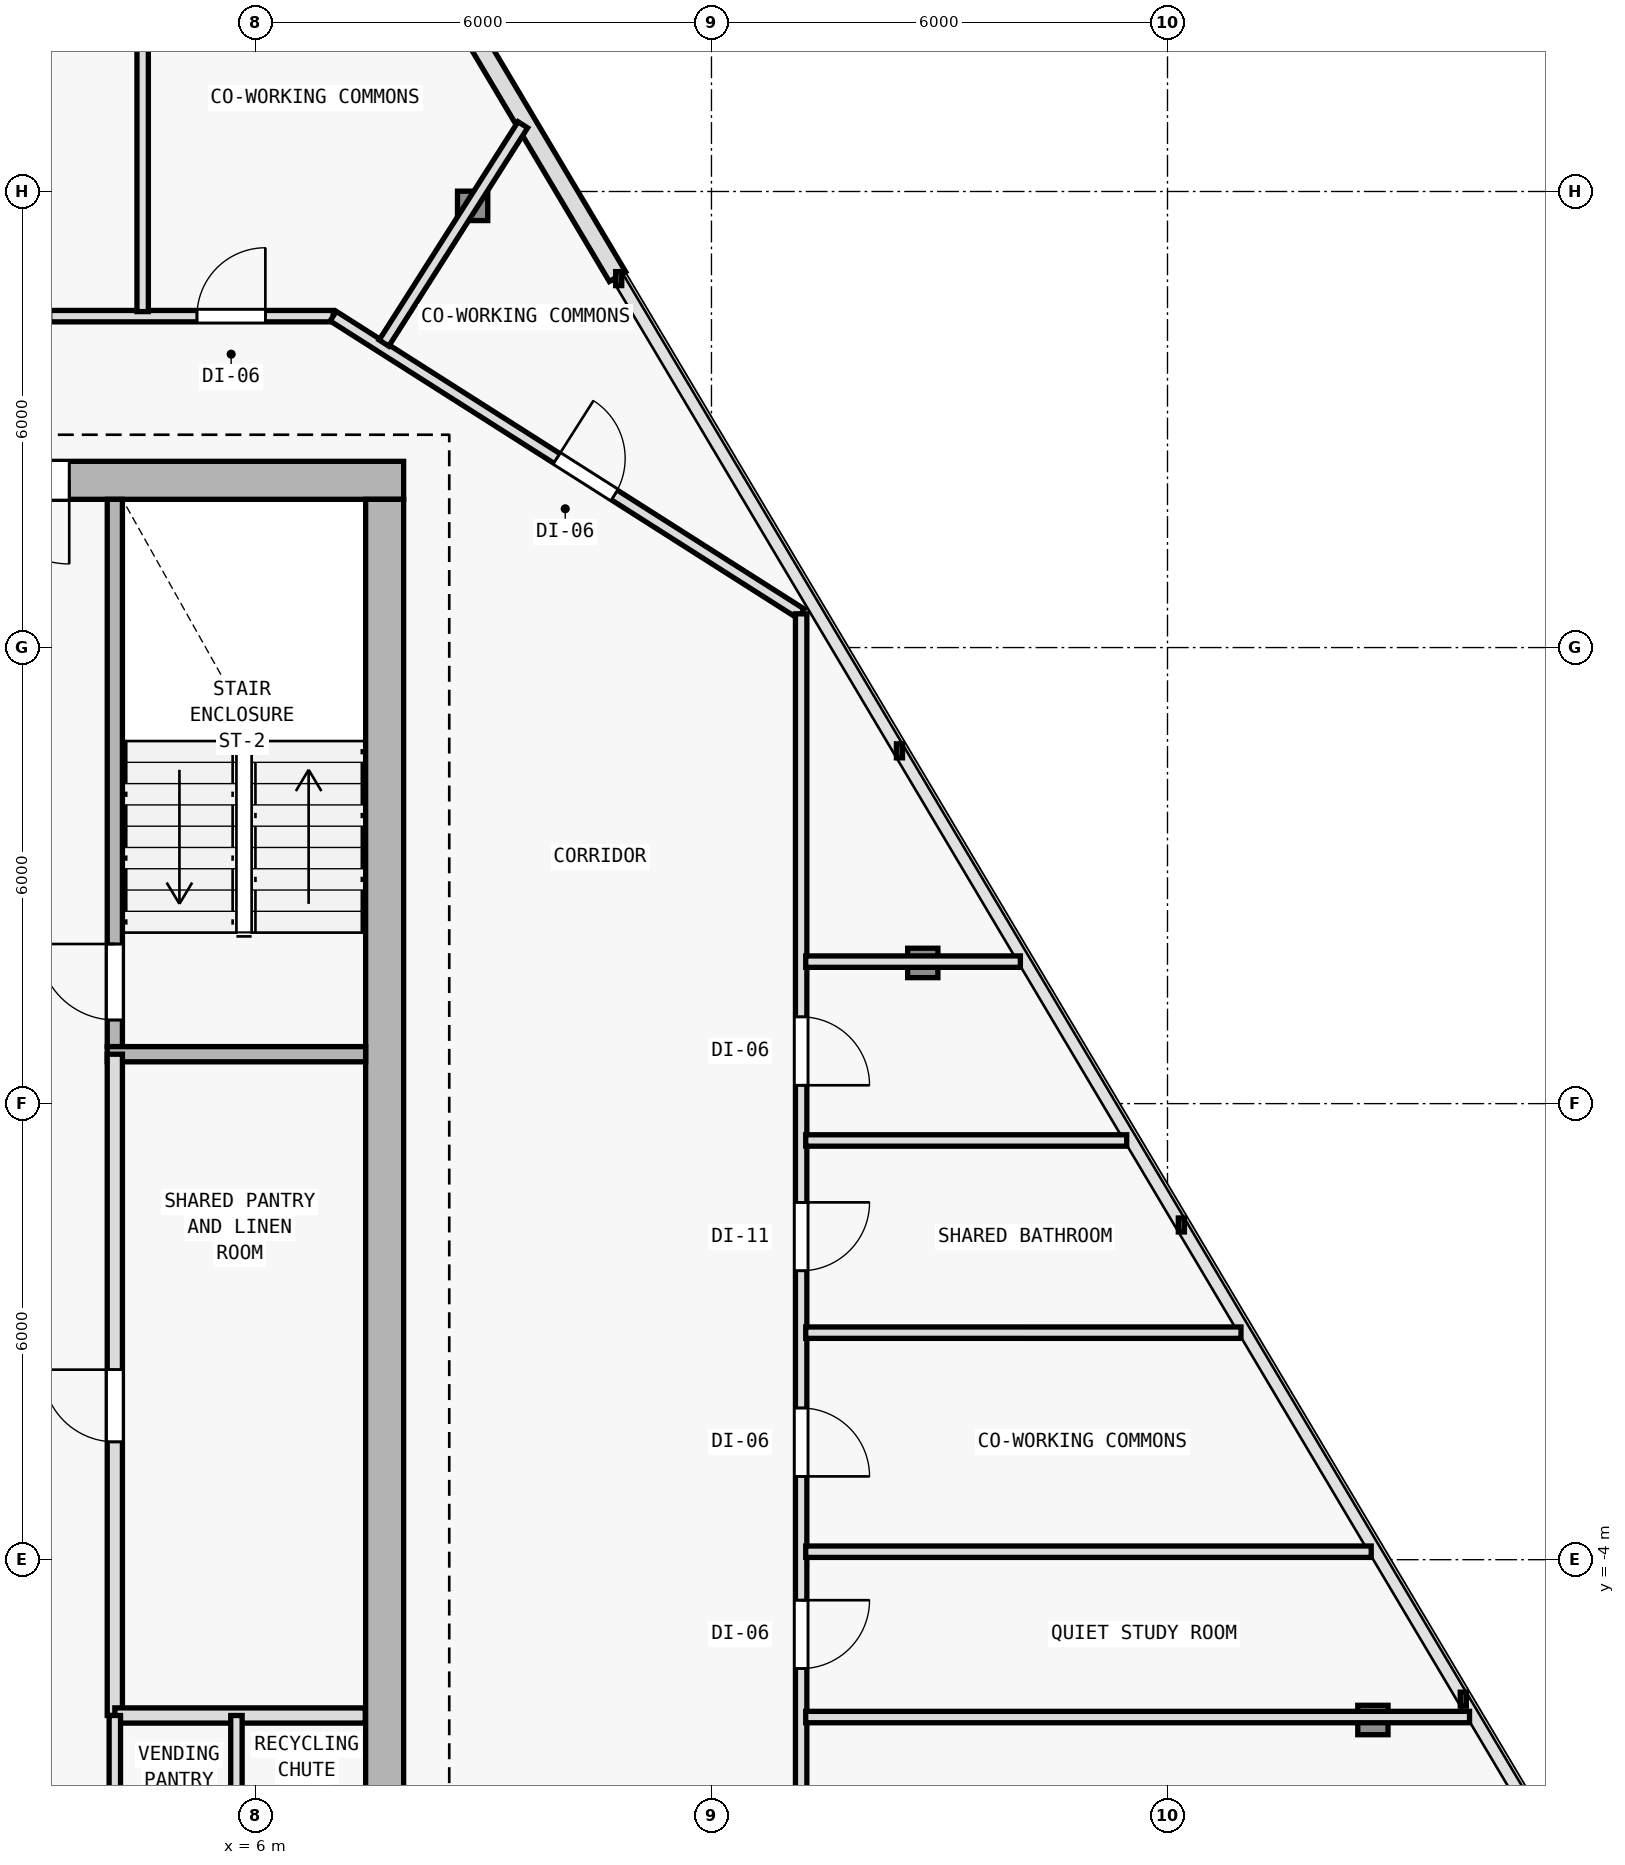
"""IFC4 building model, lengths in metres.
Left out: names, types, materials, properties, quantities, classifications, styles, units other than length and angle.
Written with IfcOpenShell. Run it as: python <this file> out.ifc"""

import sys

from ifc_helpers import new_model, si_unit, direction, frame, frame_2d, origin, origin_2d, place, context, subcontext, project, spatial, rectangle, i_section, extrude, element, fill, save


model = new_model("IFC4")
c1 = context("Model", 3, precision=1e-05, world=origin(), true_north=direction((0.0, 1.0)))
c2 = subcontext(c1, "Body", "Model", "MODEL_VIEW")
j1 = project(units=[si_unit("LENGTHUNIT", "METRE"), si_unit("PLANEANGLEUNIT", "RADIAN")], contexts=[c1])
p1 = place(None, origin())
s1 = spatial("IfcSite", under=j1, at=p1, CompositionType="ELEMENT")
p2 = place(p1, origin())
s2 = spatial("IfcBuilding", under=s1, at=p2, CompositionType="ELEMENT")
p3 = place(p2, frame((0.0, 0.0, 205.5)))
s3 = spatial("IfcBuildingStorey", under=s2, at=p3, CompositionType="ELEMENT", Elevation=205.5)
for number, where, z_axis, x_axis in (
    (1, (7.7, 10.2, 0.0), (0.0, 0.0, 1.0), (1.0, 0.0, 0.0)),
    (2, (7.7, 0.4, 0.0), (0.0, 0.0, 1.0), (1.0, 0.0, 0.0)),
):
    element("IfcColumn", number, at=place(p3, frame(where, z_axis=z_axis, x_axis=x_axis)), inside=s3, PredefinedType="COLUMN", context=c2, shape_type="SweptSolid", body=[
        extrude(i_section(OverallWidth=0.398, OverallDepth=0.387, WebThickness=0.013, FlangeThickness=0.022, FilletRadius=0.015, at=origin_2d()), origin(), (0.0, 0.0, 1.0), 3.6),
    ])
p4 = place(p3, frame((20.702, -6.109, 0.006), z_axis=(-0.026039494941, 0.021620259507, 0.999427090428), x_axis=(-0.638800249892, -0.769372628015, 0.0)))
e3 = element("IfcColumn", 3, at=p4, inside=s3, PredefinedType="COLUMN", context=c2, shape_type="SweptSolid", body=[
    extrude(i_section(OverallWidth=0.398, OverallDepth=0.387, WebThickness=0.013, FlangeThickness=0.022, FilletRadius=0.015, at=origin_2d()), origin(), (0.0, 0.0, 1.0), 3.591),
])
p5 = place(p3, frame((14.78, 3.851, 0.006), z_axis=(-0.018907326549, 0.00952167524, 0.999775900241), x_axis=(-0.449781931574, -0.893138406984, 0.0)))
e4 = element("IfcColumn", 4, at=p5, inside=s3, PredefinedType="COLUMN", context=c2, shape_type="SweptSolid", body=[
    extrude(i_section(OverallWidth=0.398, OverallDepth=0.387, WebThickness=0.013, FlangeThickness=0.022, FilletRadius=0.015, at=origin_2d()), origin(), (0.0, 0.0, 1.0), 3.59),
])
p6 = place(p3, frame((8.857, 13.811, 0.006), z_axis=(-0.011699840322, -0.002584848443, 0.999928213571), x_axis=(0.215728093413, -0.976453475447, 0.0)))
e5 = element("IfcColumn", 5, at=p6, inside=s3, PredefinedType="COLUMN", context=c2, shape_type="SweptSolid", body=[
    extrude(i_section(OverallWidth=0.398, OverallDepth=0.387, WebThickness=0.013, FlangeThickness=0.022, FilletRadius=0.015, at=origin_2d()), origin(), (0.0, 0.0, 1.0), 3.589),
])
p7 = place(p3, frame((5.551, 21.647, 0.0), z_axis=(0.0, 0.0, 1.0), x_axis=(0.511094988088, -0.859524236512, 0.0)))
e6 = element("IfcWall", 6, at=p7, inside=s3, PredefinedType="SOLIDWALL", context=c2, shape_type="SweptSolid", body=[
    extrude(rectangle(XDim=10.2, YDim=0.25, at=frame_2d((5.1, 0.0))), origin(), (0.0, 0.0, 1.0), 3.35),
])
p8 = place(p7, frame((4.65, 0.0, 0.62)))
e7 = element("IfcOpeningElement", 7, at=p8, cuts=e6, PredefinedType="OPENING", context=c2, shape_type="SweptSolid", body=[
    extrude(rectangle(XDim=0.9, YDim=1.6, at=frame_2d((0.45, 0.8))), frame((0.0, 0.135, 0.0), z_axis=(0.0, -1.0, 0.0), x_axis=(1.0, 0.0, 0.0)), (0.0, 0.0, 1.0), 0.27),
])
p9 = place(p3, frame((7.95, 10.2, 0.0), z_axis=(0.0, 0.0, 1.0), x_axis=(-1.0, 0.0, 0.0)))
e8 = element("IfcWall", 8, at=p9, inside=s3, PredefinedType="SHEAR", context=c2, shape_type="SweptSolid", body=[
    extrude(rectangle(XDim=15.9, YDim=0.5, at=frame_2d((7.95, 0.0))), origin(), (0.0, 0.0, 1.0), 3.35),
])
p10 = place(p9, frame((4.4, 0.0, 0.0)))
e9 = element("IfcOpeningElement", 9, at=p10, cuts=e8, PredefinedType="OPENING", context=c2, shape_type="SweptSolid", body=[
    extrude(rectangle(XDim=1.1, YDim=2.15, at=frame_2d((0.55, 1.075))), frame((0.0, 0.26, 0.0), z_axis=(0.0, -1.0, 0.0), x_axis=(1.0, 0.0, 0.0)), (0.0, 0.0, 1.0), 0.52),
])
p11 = place(p3, frame((7.7, 9.95, 0.0), z_axis=(0.0, 0.0, 1.0), x_axis=(0.0, -1.0, 0.0)))
e10 = element("IfcWall", 10, at=p11, inside=s3, PredefinedType="SHEAR", context=c2, shape_type="SweptSolid", body=[
    extrude(rectangle(XDim=19.1, YDim=0.5, at=frame_2d((9.55, 0.0))), origin(), (0.0, 0.0, 1.0), 3.35),
])
p12 = place(p3, frame((4.15, 2.75, 0.0), z_axis=(0.0, 0.0, 1.0), x_axis=(0.0, 1.0, 0.0)))
e11 = element("IfcWall", 11, at=p12, inside=s3, PredefinedType="SOLIDWALL", context=c2, shape_type="SweptSolid", body=[
    extrude(rectangle(XDim=7.2, YDim=0.2, at=frame_2d((3.6, 0.0))), origin(), (0.0, 0.0, 1.0), 3.35),
])
p13 = place(p12, frame((0.35, 0.0, 0.0)))
e12 = element("IfcOpeningElement", 12, at=p13, cuts=e11, PredefinedType="OPENING", context=c2, shape_type="SweptSolid", body=[
    extrude(rectangle(XDim=1.0, YDim=2.15, at=frame_2d((0.5, 1.075))), frame((0.0, 0.11, 0.0), z_axis=(0.0, -1.0, 0.0), x_axis=(1.0, 0.0, 0.0)), (0.0, 0.0, 1.0), 0.22),
])
p14 = place(p3, frame((4.05, 2.65, 0.0), z_axis=(0.0, 0.0, 1.0), x_axis=(1.0, 0.0, 0.0)))
e13 = element("IfcWall", 13, at=p14, inside=s3, PredefinedType="SOLIDWALL", context=c2, shape_type="SweptSolid", body=[
    extrude(rectangle(XDim=3.4, YDim=0.2, at=frame_2d((1.7, 0.0))), origin(), (0.0, 0.0, 1.0), 3.35),
])
p15 = place(p3, frame((4.15, -6.05, 0.0), z_axis=(0.0, 0.0, 1.0), x_axis=(0.0, 1.0, 0.0)))
e14 = element("IfcWall", 14, at=p15, inside=s3, PredefinedType="SOLIDWALL", context=c2, shape_type="SweptSolid", body=[
    extrude(rectangle(XDim=8.7, YDim=0.2, at=frame_2d((4.35, 0.0))), origin(), (0.0, 0.0, 1.0), 3.35),
])
p16 = place(p15, frame((3.6, 0.0, 0.0)))
e15 = element("IfcOpeningElement", 15, at=p16, cuts=e14, PredefinedType="OPENING", context=c2, shape_type="SweptSolid", body=[
    extrude(rectangle(XDim=0.95, YDim=2.1, at=frame_2d((0.475, 1.05))), frame((0.0, 0.11, 0.0), z_axis=(0.0, -1.0, 0.0), x_axis=(1.0, 0.0, 0.0)), (0.0, 0.0, 1.0), 0.22),
])
p17 = place(p3, frame((4.15, -6.05, 0.0), z_axis=(0.0, 0.0, 1.0), x_axis=(1.0, 0.0, 0.0)))
e16 = element("IfcWall", 16, at=p17, inside=s3, PredefinedType="SOLIDWALL", context=c2, shape_type="SweptSolid", body=[
    extrude(rectangle(XDim=3.295, YDim=0.2, at=frame_2d((1.647, 0.0))), origin(), (0.0, 0.0, 1.0), 3.35),
])
p18 = place(p3, frame((4.15, -9.145, 0.0), z_axis=(0.0, 0.0, 1.0), x_axis=(0.0, 1.0, 0.0)))
e17 = element("IfcWall", 17, at=p18, inside=s3, PredefinedType="PARTITIONING", context=c2, shape_type="SweptSolid", body=[
    extrude(rectangle(XDim=3.095, YDim=0.15, at=frame_2d((1.547, 0.0))), origin(), (0.0, 0.0, 1.0), 3.35),
])
p19 = place(p18, frame((0.845, 0.0, 0.0)))
e18 = element("IfcOpeningElement", 18, at=p19, cuts=e17, PredefinedType="OPENING", context=c2, shape_type="SweptSolid", body=[
    extrude(rectangle(XDim=0.9, YDim=2.1, at=frame_2d((0.45, 1.05))), frame((0.0, 0.085, 0.0), z_axis=(0.0, -1.0, 0.0), x_axis=(1.0, 0.0, 0.0)), (0.0, 0.0, 1.0), 0.17),
])
p20 = place(p3, frame((5.75, -9.145, 0.0), z_axis=(0.0, 0.0, 1.0), x_axis=(0.0, 1.0, 0.0)))
e19 = element("IfcWall", 19, at=p20, inside=s3, PredefinedType="PARTITIONING", context=c2, shape_type="SweptSolid", body=[
    extrude(rectangle(XDim=3.095, YDim=0.15, at=frame_2d((1.547, 0.0))), origin(), (0.0, 0.0, 1.0), 3.35),
])
p21 = place(p20, frame((0.845, 0.0, 0.0)))
e20 = element("IfcOpeningElement", 20, at=p21, cuts=e19, PredefinedType="OPENING", context=c2, shape_type="SweptSolid", body=[
    extrude(rectangle(XDim=0.9, YDim=2.1, at=frame_2d((0.45, 1.05))), frame((0.0, 0.085, 0.0), z_axis=(0.0, -1.0, 0.0), x_axis=(1.0, 0.0, 0.0)), (0.0, 0.0, 1.0), 0.17),
])
p22 = place(p3, frame((-7.041, 12.36, 0.0), z_axis=(0.0, 0.0, 1.0), x_axis=(1.0, 0.0, 0.0)))
e21 = element("IfcWall", 21, at=p22, inside=s3, PredefinedType="PARTITIONING", context=c2, shape_type="SweptSolid", body=[
    extrude(rectangle(XDim=14.064, YDim=0.15, at=frame_2d((7.032, 0.0))), origin(), (0.0, 0.0, 1.0), 2.975),
])
p23 = place(p22, frame((12.272, 0.0, 0.0)))
e22 = element("IfcOpeningElement", 22, at=p23, cuts=e21, PredefinedType="OPENING", context=c2, shape_type="SweptSolid", body=[
    extrude(rectangle(XDim=0.9, YDim=2.1, at=frame_2d((0.45, 1.05))), frame((0.0, 0.085, 0.0), z_axis=(0.0, -1.0, 0.0), x_axis=(1.0, 0.0, 0.0)), (0.0, 0.0, 1.0), 0.17),
])
p24 = place(p22, frame((9.449, 0.0, 0.0)))
e23 = element("IfcOpeningElement", 23, at=p24, cuts=e21, PredefinedType="OPENING", context=c2, shape_type="SweptSolid", body=[
    extrude(rectangle(XDim=0.9, YDim=2.1, at=frame_2d((0.45, 1.05))), frame((0.0, 0.085, 0.0), z_axis=(0.0, -1.0, 0.0), x_axis=(1.0, 0.0, 0.0)), (0.0, 0.0, 1.0), 0.17),
])
p25 = place(p22, frame((6.614, 0.0, 0.0)))
e24 = element("IfcOpeningElement", 24, at=p25, cuts=e21, PredefinedType="OPENING", context=c2, shape_type="SweptSolid", body=[
    extrude(rectangle(XDim=0.9, YDim=2.1, at=frame_2d((0.45, 1.05))), frame((0.0, 0.085, 0.0), z_axis=(0.0, -1.0, 0.0), x_axis=(1.0, 0.0, 0.0)), (0.0, 0.0, 1.0), 0.17),
])
p26 = place(p22, frame((2.786, 0.0, 0.0)))
e25 = element("IfcOpeningElement", 25, at=p26, cuts=e21, PredefinedType="OPENING", context=c2, shape_type="SweptSolid", body=[
    extrude(rectangle(XDim=0.9, YDim=2.1, at=frame_2d((0.45, 1.05))), frame((0.0, 0.085, 0.0), z_axis=(0.0, -1.0, 0.0), x_axis=(1.0, 0.0, 0.0)), (0.0, 0.0, 1.0), 0.17),
])
p27 = place(p3, frame((7.023, 12.36, 0.0), z_axis=(0.0, 0.0, 1.0), x_axis=(0.84376480085, -0.536713108511, 0.0)))
e26 = element("IfcWall", 26, at=p27, inside=s3, PredefinedType="PARTITIONING", context=c2, shape_type="SweptSolid", body=[
    extrude(rectangle(XDim=7.297, YDim=0.15, at=frame_2d((3.648, 0.0))), origin(), (0.0, 0.0, 1.0), 2.975),
])
p28 = place(p27, frame((3.486, 0.0, 0.0)))
e27 = element("IfcOpeningElement", 27, at=p28, cuts=e26, PredefinedType="OPENING", context=c2, shape_type="SweptSolid", body=[
    extrude(rectangle(XDim=0.9, YDim=2.1, at=frame_2d((0.45, 1.05))), frame((0.0, 0.085, 0.0), z_axis=(0.0, -1.0, 0.0), x_axis=(1.0, 0.0, 0.0)), (0.0, 0.0, 1.0), 0.17),
])
p29 = place(p3, frame((13.18, 8.444, 0.0), z_axis=(0.0, 0.0, 1.0), x_axis=(0.0, -1.0, 0.0)))
e28 = element("IfcWall", 28, at=p29, inside=s3, PredefinedType="PARTITIONING", context=c2, shape_type="SweptSolid", body=[
    extrude(rectangle(XDim=20.004, YDim=0.15, at=frame_2d((10.002, 0.0))), origin(), (0.0, 0.0, 1.0), 2.825),
])
p30 = place(p29, frame((12.977, 0.0, 0.0)))
e29 = element("IfcOpeningElement", 29, at=p30, cuts=e28, PredefinedType="OPENING", context=c2, shape_type="SweptSolid", body=[
    extrude(rectangle(XDim=0.9, YDim=2.1, at=frame_2d((0.45, 1.05))), frame((0.0, 0.085, 0.0), z_axis=(0.0, -1.0, 0.0), x_axis=(1.0, 0.0, 0.0)), (0.0, 0.0, 1.0), 0.17),
])
p31 = place(p29, frame((10.448, 0.0, 0.0)))
e30 = element("IfcOpeningElement", 30, at=p31, cuts=e28, PredefinedType="OPENING", context=c2, shape_type="SweptSolid", body=[
    extrude(rectangle(XDim=0.9, YDim=2.1, at=frame_2d((0.45, 1.05))), frame((0.0, 0.085, 0.0), z_axis=(0.0, -1.0, 0.0), x_axis=(1.0, 0.0, 0.0)), (0.0, 0.0, 1.0), 0.17),
])
p32 = place(p29, frame((7.743, 0.0, 0.0)))
e31 = element("IfcOpeningElement", 31, at=p32, cuts=e28, PredefinedType="OPENING", context=c2, shape_type="SweptSolid", body=[
    extrude(rectangle(XDim=0.9, YDim=2.1, at=frame_2d((0.45, 1.05))), frame((0.0, 0.085, 0.0), z_axis=(0.0, -1.0, 0.0), x_axis=(1.0, 0.0, 0.0)), (0.0, 0.0, 1.0), 0.17),
])
p33 = place(p29, frame((5.302, 0.0, 0.0)))
e32 = element("IfcOpeningElement", 32, at=p33, cuts=e28, PredefinedType="OPENING", context=c2, shape_type="SweptSolid", body=[
    extrude(rectangle(XDim=0.9, YDim=2.1, at=frame_2d((0.45, 1.05))), frame((0.0, 0.085, 0.0), z_axis=(0.0, -1.0, 0.0), x_axis=(1.0, 0.0, 0.0)), (0.0, 0.0, 1.0), 0.17),
])
p34 = place(p3, frame((13.24, -6.07, 0.0), z_axis=(0.0, 0.0, 1.0), x_axis=(1.0, 0.0, 0.0)))
e33 = element("IfcWall", 33, at=p34, inside=s3, PredefinedType="PARTITIONING", context=c2, shape_type="SweptSolid", body=[
    extrude(rectangle(XDim=8.734, YDim=0.15, at=frame_2d((4.367, 0.0))), origin(), (0.0, 0.0, 1.0), 2.825),
])
p35 = place(p3, frame((13.24, 3.868, 0.0), z_axis=(0.0, 0.0, 1.0), x_axis=(1.0, 0.0, 0.0)))
e34 = element("IfcWall", 34, at=p35, inside=s3, PredefinedType="PARTITIONING", context=c2, shape_type="SweptSolid", body=[
    extrude(rectangle(XDim=2.824, YDim=0.15, at=frame_2d((1.412, 0.0))), origin(), (0.0, 0.0, 1.0), 2.975),
])
p36 = place(p3, frame((7.691, 12.006, 0.0), z_axis=(0.0, 0.0, 1.0), x_axis=(0.536675875283, 0.843788483501, 0.0)))
e35 = element("IfcWall", 35, at=p36, inside=s3, PredefinedType="PARTITIONING", context=c2, shape_type="SweptSolid", body=[
    extrude(rectangle(XDim=3.403, YDim=0.15, at=frame_2d((1.702, 0.0))), origin(), (0.0, 0.0, 1.0), 2.975),
])
p37 = place(p3, frame((13.24, -1.013, 0.0), z_axis=(0.0, 0.0, 1.0), x_axis=(1.0, 0.0, 0.0)))
e36 = element("IfcWall", 36, at=p37, inside=s3, PredefinedType="PARTITIONING", context=c2, shape_type="SweptSolid", body=[
    extrude(rectangle(XDim=5.727, YDim=0.15, at=frame_2d((2.863, 0.0))), origin(), (0.0, 0.0, 1.0), 2.975),
])
p38 = place(p3, frame((13.24, -3.895, 0.0), z_axis=(0.0, 0.0, 1.0), x_axis=(1.0, 0.0, 0.0)))
e37 = element("IfcWall", 37, at=p38, inside=s3, PredefinedType="PARTITIONING", context=c2, shape_type="SweptSolid", body=[
    extrude(rectangle(XDim=7.44, YDim=0.15, at=frame_2d((3.72, 0.0))), origin(), (0.0, 0.0, 1.0), 2.975),
])
p39 = place(p3, frame((13.24, 1.515, 0.0), z_axis=(0.0, 0.0, 1.0), x_axis=(1.0, 0.0, 0.0)))
e38 = element("IfcWall", 38, at=p39, inside=s3, PredefinedType="PARTITIONING", context=c2, shape_type="SweptSolid", body=[
    extrude(rectangle(XDim=4.223, YDim=0.15, at=frame_2d((2.112, 0.0))), origin(), (0.0, 0.0, 1.0), 2.975),
])
p40 = place(p3, frame((4.516, 12.42, 0.0), z_axis=(0.0, 0.0, 1.0), x_axis=(0.0, 1.0, 0.0)))
e39 = element("IfcWall", 39, at=p40, inside=s3, PredefinedType="PARTITIONING", context=c2, shape_type="SweptSolid", body=[
    extrude(rectangle(XDim=8.683, YDim=0.15, at=frame_2d((4.341, 0.0))), origin(), (0.0, 0.0, 1.0), 2.975),
])
p41 = place(p10, origin())
e40 = element("IfcDoor", 40, at=p41, inside=s3, OperationType="SINGLE_SWING_LEFT", PredefinedType="DOOR", context=c2, shape_type="SweptSolid", body=[
    extrude(rectangle(XDim=1.1, YDim=2.15, at=frame_2d((0.55, 1.075))), frame((0.0, 0.025, 0.0), z_axis=(0.0, -1.0, 0.0), x_axis=(1.0, 0.0, 0.0)), (0.0, 0.0, 1.0), 0.05),
])
fill(e9, e40)
p42 = place(p13, origin())
e41 = element("IfcDoor", 41, at=p42, inside=s3, OperationType="SINGLE_SWING_RIGHT", PredefinedType="DOOR", context=c2, shape_type="SweptSolid", body=[
    extrude(rectangle(XDim=1.0, YDim=2.15, at=frame_2d((0.5, 1.075))), frame((0.0, 0.025, 0.0), z_axis=(0.0, -1.0, 0.0), x_axis=(1.0, 0.0, 0.0)), (0.0, 0.0, 1.0), 0.05),
])
fill(e12, e41)
p43 = place(p16, origin())
e42 = element("IfcDoor", 42, at=p43, inside=s3, OperationType="SINGLE_SWING_RIGHT", PredefinedType="DOOR", context=c2, shape_type="SweptSolid", body=[
    extrude(rectangle(XDim=0.95, YDim=2.1, at=frame_2d((0.475, 1.05))), frame((0.0, 0.025, 0.0), z_axis=(0.0, -1.0, 0.0), x_axis=(1.0, 0.0, 0.0)), (0.0, 0.0, 1.0), 0.05),
])
fill(e15, e42)
p44 = place(p30, origin())
e43 = element("IfcDoor", 43, at=p44, inside=s3, OperationType="SINGLE_SWING_LEFT", PredefinedType="DOOR", context=c2, shape_type="SweptSolid", body=[
    extrude(rectangle(XDim=0.9, YDim=2.1, at=frame_2d((0.45, 1.05))), frame((0.0, 0.025, 0.0), z_axis=(0.0, -1.0, 0.0), x_axis=(1.0, 0.0, 0.0)), (0.0, 0.0, 1.0), 0.05),
])
fill(e29, e43)
p45 = place(p31, origin())
e44 = element("IfcDoor", 44, at=p45, inside=s3, OperationType="SINGLE_SWING_RIGHT", PredefinedType="DOOR", context=c2, shape_type="SweptSolid", body=[
    extrude(rectangle(XDim=0.9, YDim=2.1, at=frame_2d((0.45, 1.05))), frame((0.0, 0.025, 0.0), z_axis=(0.0, -1.0, 0.0), x_axis=(1.0, 0.0, 0.0)), (0.0, 0.0, 1.0), 0.05),
])
fill(e30, e44)
p46 = place(p32, origin())
e45 = element("IfcDoor", 45, at=p46, inside=s3, OperationType="SINGLE_SWING_LEFT", PredefinedType="DOOR", context=c2, shape_type="SweptSolid", body=[
    extrude(rectangle(XDim=0.9, YDim=2.1, at=frame_2d((0.45, 1.05))), frame((0.0, 0.025, 0.0), z_axis=(0.0, -1.0, 0.0), x_axis=(1.0, 0.0, 0.0)), (0.0, 0.0, 1.0), 0.05),
])
fill(e31, e45)
p47 = place(p33, origin())
e46 = element("IfcDoor", 46, at=p47, inside=s3, OperationType="SINGLE_SWING_RIGHT", PredefinedType="DOOR", context=c2, shape_type="SweptSolid", body=[
    extrude(rectangle(XDim=0.9, YDim=2.1, at=frame_2d((0.45, 1.05))), frame((0.0, 0.025, 0.0), z_axis=(0.0, -1.0, 0.0), x_axis=(1.0, 0.0, 0.0)), (0.0, 0.0, 1.0), 0.05),
])
fill(e32, e46)
p48 = place(p28, origin())
e47 = element("IfcDoor", 47, at=p48, inside=s3, OperationType="SINGLE_SWING_LEFT", PredefinedType="DOOR", context=c2, shape_type="SweptSolid", body=[
    extrude(rectangle(XDim=0.9, YDim=2.1, at=frame_2d((0.45, 1.05))), frame((0.0, 0.025, 0.0), z_axis=(0.0, -1.0, 0.0), x_axis=(1.0, 0.0, 0.0)), (0.0, 0.0, 1.0), 0.05),
])
fill(e27, e47)
p49 = place(p23, origin())
e48 = element("IfcDoor", 48, at=p49, inside=s3, OperationType="SINGLE_SWING_RIGHT", PredefinedType="DOOR", context=c2, shape_type="SweptSolid", body=[
    extrude(rectangle(XDim=0.9, YDim=2.1, at=frame_2d((0.45, 1.05))), frame((0.0, 0.025, 0.0), z_axis=(0.0, -1.0, 0.0), x_axis=(1.0, 0.0, 0.0)), (0.0, 0.0, 1.0), 0.05),
])
fill(e22, e48)
save(model, sys.argv[1])
